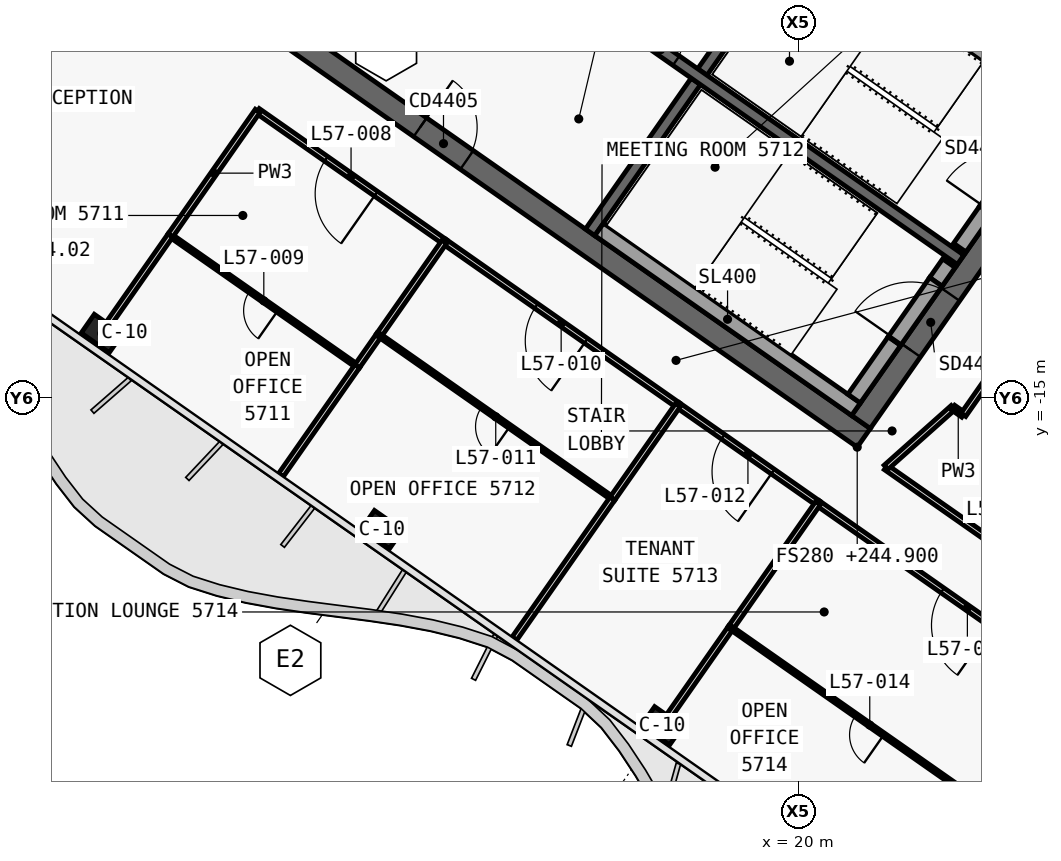
"""IFC4 building model, lengths in metres.
Left out: names, types, materials, properties, quantities, classifications, styles, units other than length and angle.
Written with IfcOpenShell. Run it as: python <this file> out.ifc"""

import sys

from ifc_helpers import new_model, si_unit, direction, frame, frame_2d, origin, origin_2d, place, context, subcontext, project, spatial, polyline, rectangle, outline, extrude, element, fill, save


model = new_model("IFC4")
c1 = context("Model", 3, precision=1e-05, world=origin(), true_north=direction((0.0, 1.0)))
c2 = subcontext(c1, "Body", "Model", "MODEL_VIEW")
j1 = project(units=[si_unit("LENGTHUNIT", "METRE"), si_unit("PLANEANGLEUNIT", "RADIAN")], contexts=[c1])
p1 = place(None, origin())
s1 = spatial("IfcSite", under=j1, at=p1, CompositionType="ELEMENT")
p2 = place(p1, origin())
s2 = spatial("IfcBuilding", under=s1, at=p2, CompositionType="ELEMENT")
p3 = place(p2, frame((0.0, 0.0, 244.9)))
s3 = spatial("IfcBuildingStorey", under=s2, at=p3, CompositionType="ELEMENT", Elevation=244.9)
p4 = place(p3, frame((0.028, 12.066, 0.0), z_axis=(0.0, 0.0, 1.0), x_axis=(0.819151382952, -0.573577380837, 0.0)))
e1 = element("IfcWall", 1, at=p4, inside=s3, PredefinedType="SHEAR", context=c2, shape_type="SweptSolid", body=[
    extrude(outline(polyline([(33.898, 0.3), (0.0, 0.3), (0.42, -0.3), (33.898, -0.3), (33.898, 0.3)])), origin(), (0.0, 0.0, 1.0), 3.9),
])
p5 = place(p3, frame((0.028, -0.874, 0.0), z_axis=(0.0, 0.0, 1.0), x_axis=(0.819150035022, -0.573579305871, 0.0)))
e2 = element("IfcWall", 2, at=p5, inside=s3, PredefinedType="SHEAR", context=c2, shape_type="SweptSolid", body=[
    extrude(outline(polyline([(26.476, 0.3), (0.0, 0.3), (0.42, -0.3), (26.476, -0.3), (26.476, 0.3)])), origin(), (0.0, 0.0, 1.0), 3.9),
])
p6 = place(p5, frame((6.576, 0.0, 0.0)))
e3 = element("IfcOpeningElement", 3, at=p6, cuts=e2, PredefinedType="OPENING", context=c2, shape_type="SweptSolid", body=[
    extrude(rectangle(XDim=1.5, YDim=2.1, at=frame_2d((0.75, 1.05))), frame((0.0, 0.31, 0.0), z_axis=(0.0, -1.0, 0.0), x_axis=(1.0, 0.0, 0.0)), (0.0, 0.0, 1.0), 0.62),
])
p7 = place(p5, frame((12.226, 0.0, 0.0)))
e4 = element("IfcOpeningElement", 4, at=p7, cuts=e2, PredefinedType="OPENING", context=c2, shape_type="SweptSolid", body=[
    extrude(rectangle(XDim=1.5, YDim=2.1, at=frame_2d((0.75, 1.05))), frame((0.0, 0.31, 0.0), z_axis=(0.0, -1.0, 0.0), x_axis=(1.0, 0.0, 0.0)), (0.0, 0.0, 1.0), 0.62),
])
p8 = place(p3, frame((21.642, -15.642, 0.0), z_axis=(0.0, 0.0, 1.0), x_axis=(0.573586866468, 0.819144740944, 0.0)))
e5 = element("IfcWall", 5, at=p8, inside=s3, PredefinedType="SHEAR", context=c2, shape_type="SweptSolid", body=[
    extrude(outline(polyline([(10.0, 0.3), (0.0, 0.3), (0.0, -0.3), (10.0, -0.3), (10.0, 0.3)])), origin(), (0.0, 0.0, 1.0), 3.9),
])
p9 = place(p8, frame((6.5, 0.0, 0.0)))
e6 = element("IfcOpeningElement", 6, at=p9, cuts=e5, PredefinedType="OPENING", context=c2, shape_type="SweptSolid", body=[
    extrude(rectangle(XDim=1.8, YDim=2.1, at=frame_2d((0.9, 1.05))), frame((0.0, 0.31, 0.0), z_axis=(0.0, -1.0, 0.0), x_axis=(1.0, 0.0, 0.0)), (0.0, 0.0, 1.0), 0.62),
])
p10 = place(p8, frame((2.3, 0.0, 0.0)))
e7 = element("IfcOpeningElement", 7, at=p10, cuts=e5, PredefinedType="OPENING", context=c2, shape_type="SweptSolid", body=[
    extrude(rectangle(XDim=1.8, YDim=2.1, at=frame_2d((0.9, 1.05))), frame((0.0, 0.31, 0.0), z_axis=(0.0, -1.0, 0.0), x_axis=(1.0, 0.0, 0.0)), (0.0, 0.0, 1.0), 0.62),
])
p11 = place(p3, frame((14.515, -10.652, 0.0), z_axis=(0.0, 0.0, 1.0), x_axis=(0.573560315113, 0.819163332265, 0.0)))
e8 = element("IfcWall", 8, at=p11, inside=s3, PredefinedType="SHEAR", context=c2, shape_type="SweptSolid", body=[
    extrude(outline(polyline([(0.0, 0.15), (0.0, -0.15), (4.85, -0.15), (4.85, 0.15), (0.0, 0.15)])), origin(), (0.0, 0.0, 1.0), 3.9),
])
p12 = place(p3, frame((17.469, -6.433, 0.0), z_axis=(0.0, 0.0, 1.0), x_axis=(0.573594092424, 0.81913968109, 0.0)))
e9 = element("IfcWall", 9, at=p12, inside=s3, PredefinedType="SHEAR", context=c2, shape_type="SweptSolid", body=[
    extrude(outline(polyline([(4.85, -0.15), (4.85, 0.15), (0.0, 0.15), (0.0, -0.15), (4.85, -0.15)])), origin(), (0.0, 0.0, 1.0), 3.9),
])
p13 = place(p3, frame((2.638, 3.768, 0.0), z_axis=(0.0, 0.0, 1.0), x_axis=(0.819155014212, -0.573572194837, 0.0)))
e10 = element("IfcWall", 10, at=p13, inside=s3, PredefinedType="SHEAR", context=c2, shape_type="SweptSolid", body=[
    extrude(outline(polyline([(0.0, 0.15), (0.0, -0.15), (26.4, -0.15), (26.4, 0.15), (0.0, 0.15)])), origin(), (0.0, 0.0, 1.0), 3.9),
])
p14 = place(p13, frame((9.637, 0.0, 0.0)))
e11 = element("IfcOpeningElement", 11, at=p14, cuts=e10, PredefinedType="OPENING", context=c2, shape_type="SweptSolid", body=[
    extrude(rectangle(XDim=1.2, YDim=2.1, at=frame_2d((0.6, 1.05))), frame((0.0, 0.16, 0.0), z_axis=(0.0, -1.0, 0.0), x_axis=(1.0, 0.0, 0.0)), (0.0, 0.0, 1.0), 0.32),
])
p15 = place(p13, frame((11.812, 0.0, 0.0)))
e12 = element("IfcOpeningElement", 12, at=p15, cuts=e10, PredefinedType="OPENING", context=c2, shape_type="SweptSolid", body=[
    extrude(rectangle(XDim=1.2, YDim=2.1, at=frame_2d((0.6, 1.05))), frame((0.0, 0.16, 0.0), z_axis=(0.0, -1.0, 0.0), x_axis=(1.0, 0.0, 0.0)), (0.0, 0.0, 1.0), 0.32),
])
p16 = place(p13, frame((13.988, 0.0, 0.0)))
e13 = element("IfcOpeningElement", 13, at=p16, cuts=e10, PredefinedType="OPENING", context=c2, shape_type="SweptSolid", body=[
    extrude(rectangle(XDim=1.2, YDim=2.1, at=frame_2d((0.6, 1.05))), frame((0.0, 0.16, 0.0), z_axis=(0.0, -1.0, 0.0), x_axis=(1.0, 0.0, 0.0)), (0.0, 0.0, 1.0), 0.32),
])
p17 = place(p13, frame((16.262, 0.0, 0.0)))
e14 = element("IfcOpeningElement", 14, at=p17, cuts=e10, PredefinedType="OPENING", context=c2, shape_type="SweptSolid", body=[
    extrude(rectangle(XDim=1.0, YDim=2.1, at=frame_2d((0.5, 1.05))), frame((0.0, 0.16, 0.0), z_axis=(0.0, -1.0, 0.0), x_axis=(1.0, 0.0, 0.0)), (0.0, 0.0, 1.0), 0.32),
])
for number, where, z_axis, x_axis in (
    (15, (1.665, -13.313, 0.0), (0.0, 0.0, 1.0), (0.819, -0.574, 0.0)),
    (16, (9.038, -18.475, 0.0), (0.0, 0.0, 1.0), (0.819, -0.574, 0.0)),
    (17, (16.41, -23.637, 0.0), (0.0, 0.0, 1.0), (0.819, -0.574, 0.0)),
):
    element("IfcColumn", number, at=place(p3, frame(where, z_axis=z_axis, x_axis=x_axis)), inside=s3, PredefinedType="COLUMN", context=c2, shape_type="SweptSolid", body=[
        extrude(rectangle(XDim=0.9, YDim=0.6, at=origin_2d()), origin(), (0.0, 0.0, 1.0), 3.9),
    ])
p18 = place(p3, frame((20.259, -2.71, 0.0), z_axis=(0.0, 0.0, 1.0), x_axis=(0.81914849389, -0.573581506813, 0.0)))
e18 = element("IfcWall", 18, at=p18, inside=s3, PredefinedType="SOLIDWALL", context=c2, shape_type="SweptSolid", body=[
    extrude(rectangle(XDim=8.25, YDim=0.4, at=frame_2d((4.125, 0.0))), origin(), (0.0, 0.0, 1.0), 3.62),
])
p19 = place(p3, frame((24.244, -11.055, 0.0), z_axis=(0.0, 0.0, 1.0), x_axis=(0.573571582932, 0.819155442668, 0.0)))
e19 = element("IfcWall", 19, at=p19, inside=s3, PredefinedType="SOLIDWALL", context=c2, shape_type="SweptSolid", body=[
    extrude(rectangle(XDim=1.2, YDim=0.4, at=frame_2d((0.6, 0.0))), origin(), (0.0, 0.0, 1.0), 3.62),
])
p20 = place(p3, frame((24.932, -10.072, 2.15), z_axis=(0.0, 0.0, 1.0), x_axis=(0.573591692345, 0.819141361715, 0.0)))
e20 = element("IfcWall", 20, at=p20, inside=s3, PredefinedType="SOLIDWALL", context=c2, shape_type="SweptSolid", body=[
    extrude(rectangle(XDim=1.9, YDim=0.4, at=frame_2d((0.95, 0.0))), origin(), (0.0, 0.0, 1.0), 1.47),
])
p21 = place(p3, frame((14.753, -10.574, 0.0), z_axis=(0.0, 0.0, 1.0), x_axis=(0.819158229677, -0.573567602601, 0.0)))
e21 = element("IfcWall", 21, at=p21, inside=s3, PredefinedType="SOLIDWALL", context=c2, shape_type="SweptSolid", body=[
    extrude(rectangle(XDim=8.25, YDim=0.4, at=frame_2d((4.125, 0.0))), origin(), (0.0, 0.0, 1.0), 3.62),
])
p22 = place(p3, frame((21.462, -15.028, 0.0), z_axis=(0.0, 0.0, 1.0), x_axis=(0.573559770908, 0.819163713305, 0.0)))
e22 = element("IfcWall", 22, at=p22, inside=s3, PredefinedType="SOLIDWALL", context=c2, shape_type="SweptSolid", body=[
    extrude(rectangle(XDim=1.85, YDim=0.4, at=frame_2d((0.925, 0.0))), origin(), (0.0, 0.0, 1.0), 3.62),
])
p23 = place(p3, frame((23.613, -11.956, 0.0), z_axis=(0.0, 0.0, 1.0), x_axis=(0.573435029941, 0.819251039936, 0.0)))
e23 = element("IfcWall", 23, at=p23, inside=s3, PredefinedType="SOLIDWALL", context=c2, shape_type="SweptSolid", body=[
    extrude(rectangle(XDim=0.6, YDim=0.4, at=frame_2d((0.3, 0.0))), origin(), (0.0, 0.0, 1.0), 3.62),
])
p24 = place(p3, frame((22.523, -13.512, 2.15), z_axis=(0.0, 0.0, 1.0), x_axis=(0.573591692345, 0.819141361715, 0.0)))
e24 = element("IfcWall", 24, at=p24, inside=s3, PredefinedType="SOLIDWALL", context=c2, shape_type="SweptSolid", body=[
    extrude(rectangle(XDim=1.9, YDim=0.4, at=frame_2d((0.95, 0.0))), origin(), (0.0, 0.0, 1.0), 1.47),
])
p25 = place(p3, frame((22.3, -16.835, 0.0), z_axis=(0.0, 0.0, 1.0), x_axis=(0.819153708931, -0.573574058989, 0.0)))
e25 = element("IfcWall", 25, at=p25, inside=s3, PredefinedType="PARTITIONING", context=c2, shape_type="SweptSolid", body=[
    extrude(rectangle(XDim=7.773, YDim=0.15, at=frame_2d((3.887, 0.0))), origin(), (0.0, 0.0, 1.0), 3.05),
])
p26 = place(p25, frame((3.087, 0.0, 0.0)))
e26 = element("IfcOpeningElement", 26, at=p26, cuts=e25, PredefinedType="OPENING", context=c2, shape_type="SweptSolid", body=[
    extrude(rectangle(XDim=1.6, YDim=2.1, at=frame_2d((0.8, 1.05))), frame((0.0, 0.085, 0.0), z_axis=(0.0, -1.0, 0.0), x_axis=(1.0, 0.0, 0.0)), (0.0, 0.0, 1.0), 0.17),
])
p27 = place(p3, frame((10.683, -10.898, 0.0), z_axis=(0.0, 0.0, 1.0), x_axis=(-0.819147828287, 0.573582457378, 0.0)))
e27 = element("IfcWall", 27, at=p27, inside=s3, PredefinedType="PARTITIONING", context=c2, shape_type="SweptSolid", body=[
    extrude(rectangle(XDim=6.002, YDim=0.15, at=frame_2d((3.001, 0.0))), origin(), (0.0, 0.0, 1.0), 3.05),
])
p28 = place(p27, frame((2.201, 0.0, 0.0)))
e28 = element("IfcOpeningElement", 28, at=p28, cuts=e27, PredefinedType="OPENING", context=c2, shape_type="SweptSolid", body=[
    extrude(rectangle(XDim=1.6, YDim=2.1, at=frame_2d((0.8, 1.05))), frame((0.0, 0.085, 0.0), z_axis=(0.0, -1.0, 0.0), x_axis=(1.0, 0.0, 0.0)), (0.0, 0.0, 1.0), 0.17),
])
p29 = place(p3, frame((16.826, -15.2, 0.0), z_axis=(0.0, 0.0, 1.0), x_axis=(-0.819138671238, 0.573595534573, 0.0)))
e29 = element("IfcWall", 29, at=p29, inside=s3, PredefinedType="PARTITIONING", context=c2, shape_type="SweptSolid", body=[
    extrude(rectangle(XDim=7.504, YDim=0.15, at=frame_2d((3.752, 0.0))), origin(), (0.0, 0.0, 1.0), 3.05),
])
p30 = place(p29, frame((2.952, 0.0, 0.0)))
e30 = element("IfcOpeningElement", 30, at=p30, cuts=e29, PredefinedType="OPENING", context=c2, shape_type="SweptSolid", body=[
    extrude(rectangle(XDim=1.6, YDim=2.1, at=frame_2d((0.8, 1.05))), frame((0.0, 0.085, 0.0), z_axis=(0.0, -1.0, 0.0), x_axis=(1.0, 0.0, 0.0)), (0.0, 0.0, 1.0), 0.17),
])
p31 = place(p3, frame((20.513, -17.781, 0.0), z_axis=(0.0, 0.0, 1.0), x_axis=(-0.819165703328, 0.573556928727, 0.0)))
e31 = element("IfcWall", 31, at=p31, inside=s3, PredefinedType="PARTITIONING", context=c2, shape_type="SweptSolid", body=[
    extrude(rectangle(XDim=4.504, YDim=0.15, at=frame_2d((2.252, 0.0))), origin(), (0.0, 0.0, 1.0), 3.05),
])
p32 = place(p31, frame((1.452, 0.0, 0.0)))
e32 = element("IfcOpeningElement", 32, at=p32, cuts=e31, PredefinedType="OPENING", context=c2, shape_type="SweptSolid", body=[
    extrude(rectangle(XDim=1.6, YDim=2.1, at=frame_2d((0.8, 1.05))), frame((0.0, 0.085, 0.0), z_axis=(0.0, -1.0, 0.0), x_axis=(1.0, 0.0, 0.0)), (0.0, 0.0, 1.0), 0.17),
])
p33 = place(p3, frame((28.375, -23.287, 0.0), z_axis=(0.0, 0.0, 1.0), x_axis=(-0.819147101588, 0.573583495196, 0.0)))
e33 = element("IfcWall", 33, at=p33, inside=s3, PredefinedType="PARTITIONING", context=c2, shape_type="SweptSolid", body=[
    extrude(rectangle(XDim=9.602, YDim=0.15, at=frame_2d((4.801, 0.0))), origin(), (0.0, 0.0, 1.0), 3.0),
])
p34 = place(p33, frame((4.001, 0.0, 0.0)))
e34 = element("IfcOpeningElement", 34, at=p34, cuts=e33, PredefinedType="OPENING", context=c2, shape_type="SweptSolid", body=[
    extrude(rectangle(XDim=1.6, YDim=2.1, at=frame_2d((0.8, 1.05))), frame((0.0, 0.085, 0.0), z_axis=(0.0, -1.0, 0.0), x_axis=(1.0, 0.0, 0.0)), (0.0, 0.0, 1.0), 0.17),
])
p35 = place(p3, frame((22.301, -16.836, 0.0), z_axis=(0.0, 0.0, 1.0), x_axis=(0.746924703007, 0.664908631345, 0.0)))
e35 = element("IfcWall", 35, at=p35, inside=s3, PredefinedType="PARTITIONING", context=c2, shape_type="SweptSolid", body=[
    extrude(rectangle(XDim=2.364, YDim=0.15, at=frame_2d((1.182, 0.0))), origin(), (0.0, 0.0, 1.0), 3.62),
])
p36 = place(p3, frame((24.067, -15.265, 0.0), z_axis=(0.0, 0.0, 1.0), x_axis=(0.819092976344, -0.573660784876, 0.0)))
e36 = element("IfcWall", 36, at=p36, inside=s3, PredefinedType="PARTITIONING", context=c2, shape_type="SweptSolid", body=[
    extrude(rectangle(XDim=0.33, YDim=0.15, at=frame_2d((0.165, 0.0))), origin(), (0.0, 0.0, 1.0), 3.62),
])
p37 = place(p3, frame((24.337, -15.454, 0.0), z_axis=(0.0, 0.0, 1.0), x_axis=(0.573626181702, 0.819117209968, 0.0)))
e37 = element("IfcWall", 37, at=p37, inside=s3, PredefinedType="PARTITIONING", context=c2, shape_type="SweptSolid", body=[
    extrude(rectangle(XDim=2.7, YDim=0.15, at=frame_2d((1.35, 0.0))), origin(), (0.0, 0.0, 1.0), 3.62),
])
p38 = place(p3, frame((8.386, -14.175, 0.0), z_axis=(0.0, 0.0, 1.0), x_axis=(-0.819143979704, 0.5735879536, 0.0)))
e38 = element("IfcWall", 38, at=p38, inside=s3, PredefinedType="PARTITIONING", context=c2, shape_type="SweptSolid", body=[
    extrude(rectangle(XDim=6.0, YDim=0.1, at=frame_2d((3.0, 0.0))), origin(), (0.0, 0.0, 1.0), 3.05),
])
p39 = place(p38, frame((2.55, 0.0, 0.0)))
e39 = element("IfcOpeningElement", 39, at=p39, cuts=e38, PredefinedType="OPENING", context=c2, shape_type="SweptSolid", body=[
    extrude(rectangle(XDim=0.9, YDim=2.1, at=frame_2d((0.45, 1.05))), frame((0.0, 0.06, 0.0), z_axis=(0.0, -1.0, 0.0), x_axis=(1.0, 0.0, 0.0)), (0.0, 0.0, 1.0), 0.12),
])
p40 = place(p3, frame((8.386, -14.175, 0.0), z_axis=(0.0, 0.0, 1.0), x_axis=(-0.573602818234, -0.819133570863, 0.0)))
e40 = element("IfcWall", 40, at=p40, inside=s3, PredefinedType="PARTITIONING", context=c2, shape_type="SweptSolid", body=[
    extrude(rectangle(XDim=3.499, YDim=0.15, at=frame_2d((1.75, 0.0))), origin(), (0.0, 0.0, 1.0), 3.0),
])
p41 = place(p3, frame((1.849, -13.051, 0.0), z_axis=(0.0, 0.0, 1.0), x_axis=(0.573555012677, 0.819167044889, 0.0)))
e41 = element("IfcWall", 41, at=p41, inside=s3, PredefinedType="PARTITIONING", context=c2, shape_type="SweptSolid", body=[
    extrude(rectangle(XDim=2.829, YDim=0.15, at=frame_2d((1.415, 0.0))), origin(), (0.0, 0.0, 1.0), 3.05),
])
p42 = place(p3, frame((8.961, -13.354, 0.0), z_axis=(0.0, 0.0, 1.0), x_axis=(-0.573691505171, -0.819071460188, 0.0)))
e42 = element("IfcWall", 42, at=p42, inside=s3, PredefinedType="PARTITIONING", context=c2, shape_type="SweptSolid", body=[
    extrude(rectangle(XDim=1.001, YDim=0.15, at=frame_2d((0.5, 0.0))), origin(), (0.0, 0.0, 1.0), 3.62),
])
p43 = place(p3, frame((10.681, -10.897, 0.0), z_axis=(0.0, 0.0, 1.0), x_axis=(-0.57356603932, -0.81915932427, 0.0)))
e43 = element("IfcWall", 43, at=p43, inside=s3, PredefinedType="PARTITIONING", context=c2, shape_type="SweptSolid", body=[
    extrude(rectangle(XDim=3.002, YDim=0.15, at=frame_2d((1.501, 0.0))), origin(), (0.0, 0.0, 1.0), 3.62),
])
p44 = place(p3, frame((3.472, -10.732, 0.0), z_axis=(0.0, 0.0, 1.0), x_axis=(0.573597512525, 0.819137286189, 0.0)))
e44 = element("IfcWall", 44, at=p44, inside=s3, PredefinedType="PARTITIONING", context=c2, shape_type="SweptSolid", body=[
    extrude(rectangle(XDim=4.0, YDim=0.15, at=frame_2d((2.0, 0.0))), origin(), (0.0, 0.0, 1.0), 3.05),
])
p45 = place(p3, frame((15.104, -17.657, 0.0), z_axis=(0.0, 0.0, 1.0), x_axis=(-0.819137093595, 0.573597787563, 0.0)))
e45 = element("IfcWall", 45, at=p45, inside=s3, PredefinedType="PARTITIONING", context=c2, shape_type="SweptSolid", body=[
    extrude(rectangle(XDim=7.5, YDim=0.1, at=frame_2d((3.75, 0.0))), origin(), (0.0, 0.0, 1.0), 3.05),
])
p46 = place(p45, frame((3.3, 0.0, 0.0)))
e46 = element("IfcOpeningElement", 46, at=p46, cuts=e45, PredefinedType="OPENING", context=c2, shape_type="SweptSolid", body=[
    extrude(rectangle(XDim=0.9, YDim=2.1, at=frame_2d((0.45, 1.05))), frame((0.0, 0.06, 0.0), z_axis=(0.0, -1.0, 0.0), x_axis=(1.0, 0.0, 0.0)), (0.0, 0.0, 1.0), 0.12),
])
p47 = place(p3, frame((15.104, -17.657, 0.0), z_axis=(0.0, 0.0, 1.0), x_axis=(-0.573553393703, -0.819168178442, 0.0)))
e47 = element("IfcWall", 47, at=p47, inside=s3, PredefinedType="PARTITIONING", context=c2, shape_type="SweptSolid", body=[
    extrude(rectangle(XDim=4.499, YDim=0.15, at=frame_2d((2.25, 0.0))), origin(), (0.0, 0.0, 1.0), 3.0),
])
p48 = place(p3, frame((16.825, -15.199, 0.0), z_axis=(0.0, 0.0, 1.0), x_axis=(-0.573598887793, -0.819136323161, 0.0)))
e48 = element("IfcWall", 48, at=p48, inside=s3, PredefinedType="PARTITIONING", context=c2, shape_type="SweptSolid", body=[
    extrude(rectangle(XDim=3.0, YDim=0.15, at=frame_2d((1.5, 0.0))), origin(), (0.0, 0.0, 1.0), 3.62),
])
p49 = place(p3, frame((18.217, -21.056, 0.0), z_axis=(0.0, 0.0, 1.0), x_axis=(-0.573560731169, -0.819163040952, 0.0)))
e49 = element("IfcWall", 49, at=p49, inside=s3, PredefinedType="PARTITIONING", context=c2, shape_type="SweptSolid", body=[
    extrude(rectangle(XDim=2.831, YDim=0.15, at=frame_2d((1.416, 0.0))), origin(), (0.0, 0.0, 1.0), 3.05),
])
p50 = place(p3, frame((20.511, -17.78, 0.0), z_axis=(0.0, 0.0, 1.0), x_axis=(-0.573589265117, -0.819143061341, 0.0)))
e50 = element("IfcWall", 50, at=p50, inside=s3, PredefinedType="PARTITIONING", context=c2, shape_type="SweptSolid", body=[
    extrude(rectangle(XDim=4.002, YDim=0.15, at=frame_2d((2.001, 0.0))), origin(), (0.0, 0.0, 1.0), 3.05),
])
p51 = place(p3, frame((25.531, -26.18, 0.0), z_axis=(0.0, 0.0, 1.0), x_axis=(-0.819147140662, 0.573583439393, 0.0)))
e51 = element("IfcWall", 51, at=p51, inside=s3, PredefinedType="PARTITIONING", context=c2, shape_type="SweptSolid", body=[
    extrude(rectangle(XDim=8.93, YDim=0.1, at=frame_2d((4.465, 0.0))), origin(), (0.0, 0.0, 1.0), 3.0),
])
p52 = place(p51, frame((4.015, 0.0, 0.0)))
e52 = element("IfcOpeningElement", 52, at=p52, cuts=e51, PredefinedType="OPENING", context=c2, shape_type="SweptSolid", body=[
    extrude(rectangle(XDim=0.9, YDim=2.1, at=frame_2d((0.45, 1.05))), frame((0.0, 0.06, 0.0), z_axis=(0.0, -1.0, 0.0), x_axis=(1.0, 0.0, 0.0)), (0.0, 0.0, 1.0), 0.12),
])
p53 = place(p17, origin())
e53 = element("IfcDoor", 53, at=p53, inside=s3, OperationType="SINGLE_SWING_RIGHT", PredefinedType="DOOR", context=c2, shape_type="SweptSolid", body=[
    extrude(rectangle(XDim=1.0, YDim=2.1, at=frame_2d((0.5, 1.05))), frame((0.0, 0.025, 0.0), z_axis=(0.0, -1.0, 0.0), x_axis=(1.0, 0.0, 0.0)), (0.0, 0.0, 1.0), 0.05),
])
fill(e14, e53)
p54 = place(p7, origin())
e54 = element("IfcDoor", 54, at=p54, inside=s3, OperationType="DOUBLE_DOOR_SINGLE_SWING", PredefinedType="DOOR", context=c2, shape_type="SweptSolid", body=[
    extrude(rectangle(XDim=1.5, YDim=2.1, at=frame_2d((0.75, 1.05))), frame((0.0, 0.025, 0.0), z_axis=(0.0, -1.0, 0.0), x_axis=(1.0, 0.0, 0.0)), (0.0, 0.0, 1.0), 0.05),
])
fill(e4, e54)
p55 = place(p10, origin())
e55 = element("IfcDoor", 55, at=p55, inside=s3, OperationType="DOUBLE_DOOR_SINGLE_SWING", PredefinedType="DOOR", context=c2, shape_type="SweptSolid", body=[
    extrude(rectangle(XDim=1.8, YDim=2.1, at=frame_2d((0.9, 1.05))), frame((0.0, 0.025, 0.0), z_axis=(0.0, -1.0, 0.0), x_axis=(1.0, 0.0, 0.0)), (0.0, 0.0, 1.0), 0.05),
])
fill(e7, e55)
p56 = place(p28, origin())
e56 = element("IfcDoor", 56, at=p56, inside=s3, OperationType="DOUBLE_DOOR_SINGLE_SWING", PredefinedType="DOOR", context=c2, shape_type="SweptSolid", body=[
    extrude(rectangle(XDim=1.6, YDim=2.1, at=frame_2d((0.8, 1.05))), frame((0.0, 0.025, 0.0), z_axis=(0.0, -1.0, 0.0), x_axis=(1.0, 0.0, 0.0)), (0.0, 0.0, 1.0), 0.05),
])
fill(e28, e56)
p57 = place(p39, origin())
e57 = element("IfcDoor", 57, at=p57, inside=s3, OperationType="SINGLE_SWING_LEFT", PredefinedType="DOOR", context=c2, shape_type="SweptSolid", body=[
    extrude(rectangle(XDim=0.9, YDim=2.1, at=frame_2d((0.45, 1.05))), frame((0.0, 0.025, 0.0), z_axis=(0.0, -1.0, 0.0), x_axis=(1.0, 0.0, 0.0)), (0.0, 0.0, 1.0), 0.05),
])
fill(e39, e57)
p58 = place(p30, origin())
e58 = element("IfcDoor", 58, at=p58, inside=s3, OperationType="DOUBLE_DOOR_SINGLE_SWING", PredefinedType="DOOR", context=c2, shape_type="SweptSolid", body=[
    extrude(rectangle(XDim=1.6, YDim=2.1, at=frame_2d((0.8, 1.05))), frame((0.0, 0.025, 0.0), z_axis=(0.0, -1.0, 0.0), x_axis=(1.0, 0.0, 0.0)), (0.0, 0.0, 1.0), 0.05),
])
fill(e30, e58)
p59 = place(p46, origin())
e59 = element("IfcDoor", 59, at=p59, inside=s3, OperationType="SINGLE_SWING_LEFT", PredefinedType="DOOR", context=c2, shape_type="SweptSolid", body=[
    extrude(rectangle(XDim=0.9, YDim=2.1, at=frame_2d((0.45, 1.05))), frame((0.0, 0.025, 0.0), z_axis=(0.0, -1.0, 0.0), x_axis=(1.0, 0.0, 0.0)), (0.0, 0.0, 1.0), 0.05),
])
fill(e46, e59)
p60 = place(p32, origin())
e60 = element("IfcDoor", 60, at=p60, inside=s3, OperationType="DOUBLE_DOOR_SINGLE_SWING", PredefinedType="DOOR", context=c2, shape_type="SweptSolid", body=[
    extrude(rectangle(XDim=1.6, YDim=2.1, at=frame_2d((0.8, 1.05))), frame((0.0, 0.025, 0.0), z_axis=(0.0, -1.0, 0.0), x_axis=(1.0, 0.0, 0.0)), (0.0, 0.0, 1.0), 0.05),
])
fill(e32, e60)
p61 = place(p34, origin())
e61 = element("IfcDoor", 61, at=p61, inside=s3, OperationType="DOUBLE_DOOR_SINGLE_SWING", PredefinedType="DOOR", context=c2, shape_type="SweptSolid", body=[
    extrude(rectangle(XDim=1.6, YDim=2.1, at=frame_2d((0.8, 1.05))), frame((0.0, 0.025, 0.0), z_axis=(0.0, -1.0, 0.0), x_axis=(1.0, 0.0, 0.0)), (0.0, 0.0, 1.0), 0.05),
])
fill(e34, e61)
p62 = place(p52, origin())
e62 = element("IfcDoor", 62, at=p62, inside=s3, OperationType="SINGLE_SWING_LEFT", PredefinedType="DOOR", context=c2, shape_type="SweptSolid", body=[
    extrude(rectangle(XDim=0.9, YDim=2.1, at=frame_2d((0.45, 1.05))), frame((0.0, 0.025, 0.0), z_axis=(0.0, -1.0, 0.0), x_axis=(1.0, 0.0, 0.0)), (0.0, 0.0, 1.0), 0.05),
])
fill(e52, e62)
save(model, sys.argv[1])
